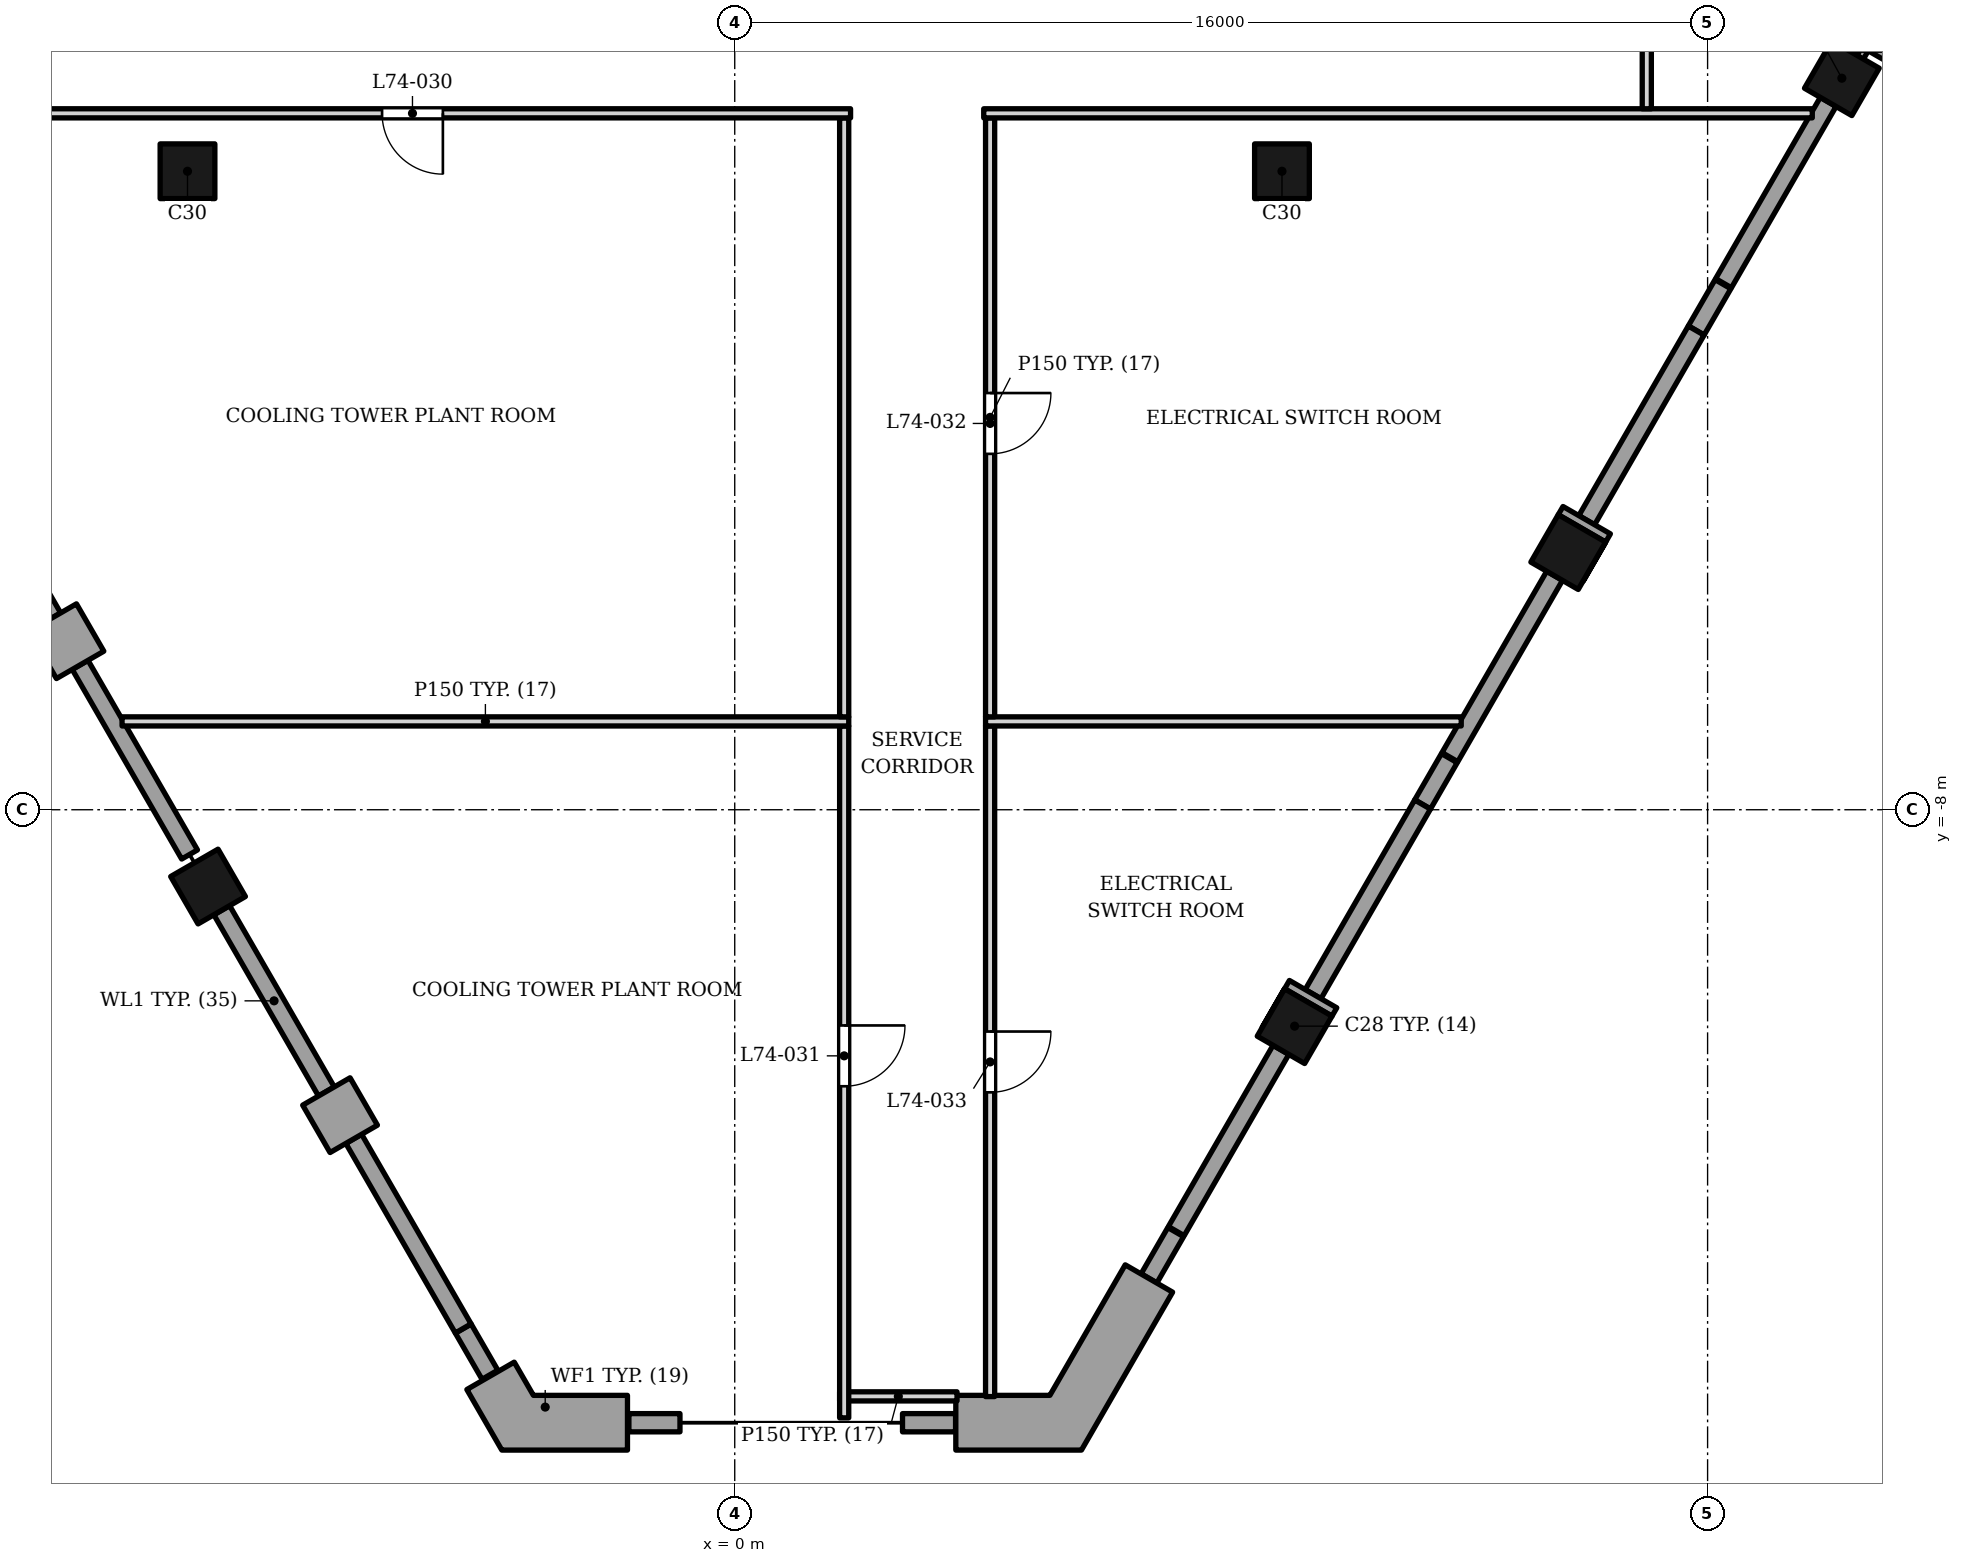
"""IFC4 building model, lengths in metres.
Left out: names, types, materials, properties, quantities, classifications, styles, units other than length and angle.
Written with IfcOpenShell. Run it as: python <this file> out.ifc"""

import sys

from ifc_helpers import new_model, si_unit, direction, frame, frame_2d, origin, origin_2d, place, context, subcontext, project, spatial, polyline, rectangle, outline, extrude, element, fill, save


model = new_model("IFC4")
c1 = context("Model", 3, precision=1e-05, world=origin(), true_north=direction((0.0, 1.0)))
c2 = subcontext(c1, "Body", "Model", "MODEL_VIEW")
j1 = project(units=[si_unit("LENGTHUNIT", "METRE"), si_unit("PLANEANGLEUNIT", "RADIAN")], contexts=[c1])
p1 = place(None, origin())
s1 = spatial("IfcSite", under=j1, at=p1, CompositionType="ELEMENT")
p2 = place(p1, origin())
s2 = spatial("IfcBuilding", under=s1, at=p2, CompositionType="ELEMENT")
p3 = place(p2, frame((0.0, 0.0, 315.5)))
s3 = spatial("IfcBuildingStorey", under=s2, at=p3, CompositionType="ELEMENT", Elevation=315.5)
for number, where, z_axis, x_axis in (
    (1, (-9.0, 2.5, 0.0), (0.0, 0.0, 1.0), (1.0, 0.0, 0.0)),
    (2, (9.0, 2.5, 0.0), (0.0, 0.0, 1.0), (1.0, 0.0, 0.0)),
    (3, (-8.662, -9.263, 0.0), (0.0, 0.0, 1.0), (0.5, -0.866, 0.0)),
    (4, (9.208, -11.559, 0.0), (0.0, 0.0, 1.0), (0.5, 0.866, 0.0)),
    (5, (13.708, -3.763, 0.0), (0.0, 0.0, 1.0), (0.5, 0.866, 0.0)),
    (6, (18.208, 4.03, 0.0), (0.0, 0.0, 1.0), (0.5, 0.866, 0.0)),
):
    element("IfcColumn", number, at=place(p3, frame(where, z_axis=z_axis, x_axis=x_axis)), inside=s3, PredefinedType="COLUMN", context=c2, shape_type="SweptSolid", body=[
        extrude(rectangle(XDim=0.9, YDim=0.9, at=origin_2d()), origin(), (0.0, 0.0, 1.0), 5.0),
    ])
for number, where, z_axis, x_axis in (
    (7, (-11.216, -4.839, 0.0), (0.0, 0.0, 1.0), (0.5, -0.866, 0.0)),
    (8, (-6.716, -12.633, 0.0), (0.0, 0.0, 1.0), (0.5, -0.866, 0.0)),
):
    element("IfcWall", number, at=place(p3, frame(where, z_axis=z_axis, x_axis=x_axis)), inside=s3, PredefinedType="SOLIDWALL", context=c2, shape_type="SweptSolid", body=[
        extrude(rectangle(XDim=0.9, YDim=0.9, at=frame_2d((0.45, 0.0))), origin(), (0.0, 0.0, 1.0), 3.8),
    ])
p4 = place(p3, origin())
e9 = element("IfcWall", 9, at=p4, inside=s3, PredefinedType="ELEMENTEDWALL", context=c2, shape_type="SweptSolid", body=[
    extrude(outline(polyline([(-11.086, -4.764), (-12.807, -1.783), (-13.067, -1.933), (-11.346, -4.914), (-11.086, -4.764)])), origin(), (0.0, 0.0, 1.0), 3.8),
])
p5 = place(p3, frame((-10.766, -5.618, 0.0), z_axis=(0.0, 0.0, 1.0), x_axis=(0.499961193289, -0.866047807691, 0.0)))
e10 = element("IfcWall", 10, at=p5, inside=s3, PredefinedType="ELEMENTEDWALL", context=c2, shape_type="SweptSolid", body=[
    extrude(rectangle(XDim=3.6, YDim=0.3, at=frame_2d((1.8, 0.0))), origin(), (0.0, 0.0, 1.0), 3.8),
])
p6 = place(p3, origin())
e11 = element("IfcWall", 11, at=p6, inside=s3, PredefinedType="ELEMENTEDWALL", context=c2, shape_type="SweptSolid", body=[
    extrude(outline(polyline([(-6.586, -12.558), (-8.307, -9.578), (-8.567, -9.728), (-6.846, -12.708), (-6.586, -12.558)])), origin(), (0.0, 0.0, 1.0), 3.8),
])
p7 = place(p3, frame((-6.266, -13.412, 0.0), z_axis=(0.0, 0.0, 1.0), x_axis=(0.499961193289, -0.866047807691, 0.0)))
e12 = element("IfcWall", 12, at=p7, inside=s3, PredefinedType="ELEMENTEDWALL", context=c2, shape_type="SweptSolid", body=[
    extrude(rectangle(XDim=3.6, YDim=0.3, at=frame_2d((1.8, 0.0))), origin(), (0.0, 0.0, 1.0), 3.8),
])
p8 = place(p3, origin())
e13 = element("IfcWall", 13, at=p8, inside=s3, PredefinedType="SOLIDWALL", context=c2, shape_type="SweptSolid", body=[
    extrude(outline(polyline([(9.122, -10.807), (8.672, -11.587), (8.672, -11.587), (9.043, -10.944), (9.823, -11.394), (9.902, -11.257), (9.122, -10.807)])), origin(), (0.0, 0.0, 1.0), 3.8),
])
p9 = place(p3, origin())
e14 = element("IfcWall", 14, at=p9, inside=s3, PredefinedType="SOLIDWALL", context=c2, shape_type="SweptSolid", body=[
    extrude(outline(polyline([(14.402, -3.463), (13.622, -3.013), (13.544, -3.149), (14.323, -3.598), (13.951, -4.242), (13.952, -4.242), (14.402, -3.463)])), origin(), (0.0, 0.0, 1.0), 3.8),
])
p10 = place(p3, origin())
e15 = element("IfcWall", 15, at=p10, inside=s3, PredefinedType="ELEMENTEDWALL", context=c2, shape_type="SweptSolid", body=[
    extrude(outline(polyline([(7.392, -15.004), (9.113, -12.024), (8.853, -11.874), (7.132, -14.854), (7.392, -15.004)])), origin(), (0.0, 0.0, 1.0), 3.8),
])
p11 = place(p3, frame((9.512, -11.032, 0.0), z_axis=(0.0, 0.0, 1.0), x_axis=(0.500012057535, 0.866018442252, 0.0)))
e16 = element("IfcWall", 16, at=p11, inside=s3, PredefinedType="ELEMENTEDWALL", context=c2, shape_type="SweptSolid", body=[
    extrude(rectangle(XDim=3.6, YDim=0.3, at=frame_2d((1.8, 0.0))), origin(), (0.0, 0.0, 1.0), 3.8),
])
p12 = place(p3, origin())
e17 = element("IfcWall", 17, at=p12, inside=s3, PredefinedType="ELEMENTEDWALL", context=c2, shape_type="SweptSolid", body=[
    extrude(outline(polyline([(11.892, -7.21), (13.614, -4.228), (13.354, -4.078), (11.632, -7.06), (11.892, -7.21)])), origin(), (0.0, 0.0, 1.0), 3.8),
])
p13 = place(p3, frame((14.012, -3.238, 0.0), z_axis=(0.0, 0.0, 1.0), x_axis=(0.500012057535, 0.866018442252, 0.0)))
e18 = element("IfcWall", 18, at=p13, inside=s3, PredefinedType="ELEMENTEDWALL", context=c2, shape_type="SweptSolid", body=[
    extrude(rectangle(XDim=3.6, YDim=0.3, at=frame_2d((1.8, 0.0))), origin(), (0.0, 0.0, 1.0), 3.8),
])
p14 = place(p3, origin())
e19 = element("IfcWall", 19, at=p14, inside=s3, PredefinedType="ELEMENTEDWALL", context=c2, shape_type="SweptSolid", body=[
    extrude(outline(polyline([(16.392, 0.584), (18.113, 3.565), (17.853, 3.715), (16.132, 0.734), (16.392, 0.584)])), origin(), (0.0, 0.0, 1.0), 3.8),
])
p15 = place(p3, origin())
e20 = element("IfcWall", 20, at=p15, inside=s3, PredefinedType="SOLIDWALL", context=c2, shape_type="SweptSolid", body=[
    extrude(outline(polyline([(-3.626, -17.084), (-4.406, -17.535), (-3.831, -18.531), (-1.764, -18.531), (-1.764, -17.631), (-3.311, -17.631), (-3.626, -17.084)])), origin(), (0.0, 0.0, 1.0), 3.297),
])
p16 = place(p3, origin())
e21 = element("IfcWall", 21, at=p16, inside=s3, PredefinedType="SOLIDWALL", context=c2, shape_type="SweptSolid", body=[
    extrude(outline(polyline([(3.636, -17.631), (3.636, -18.531), (5.702, -18.531), (7.202, -15.934), (6.422, -15.484), (5.183, -17.631), (3.636, -17.631)])), origin(), (0.0, 0.0, 1.0), 3.297),
])
p17 = place(p3, origin())
e22 = element("IfcWall", 22, at=p17, inside=s3, PredefinedType="SOLIDWALL", context=c2, shape_type="SweptSolid", body=[
    extrude(outline(polyline([(18.122, 4.781), (18.902, 4.331), (20.247, 6.661), (21.059, 7.549), (20.395, 8.156), (19.516, 7.196), (18.122, 4.781)])), origin(), (0.0, 0.0, 1.0), 3.8),
])
p18 = place(p3, frame((-4.026, -17.292, 0.0), z_axis=(0.0, 0.0, 1.0), x_axis=(-0.500068485402, 0.865985860108, 0.0)))
e23 = element("IfcWall", 23, at=p18, inside=s3, PredefinedType="ELEMENTEDWALL", context=c2, shape_type="SweptSolid", body=[
    extrude(rectangle(XDim=0.875, YDim=0.3, at=frame_2d((0.438, 0.0))), origin(), (0.0, 0.0, 1.0), 3.8),
])
p19 = place(p3, frame((-1.741, -18.081, 0.0), z_axis=(0.0, 0.0, 1.0), x_axis=(1.0, 0.0, 0.0)))
e24 = element("IfcWall", 24, at=p19, inside=s3, PredefinedType="ELEMENTEDWALL", context=c2, shape_type="SweptSolid", body=[
    extrude(rectangle(XDim=0.84, YDim=0.3, at=frame_2d((0.42, 0.0))), origin(), (0.0, 0.0, 1.0), 3.279),
])
p20 = place(p3, frame((2.759, -18.081, 0.0), z_axis=(0.0, 0.0, 1.0), x_axis=(1.0, 0.0, 0.0)))
e25 = element("IfcWall", 25, at=p20, inside=s3, PredefinedType="ELEMENTEDWALL", context=c2, shape_type="SweptSolid", body=[
    extrude(rectangle(XDim=0.873, YDim=0.3, at=frame_2d((0.436, 0.0))), origin(), (0.0, 0.0, 1.0), 3.279),
])
for number, where, z_axis, x_axis in (
    (26, (6.814, -15.705, 0.0), (0.0, 0.0, 1.0), (0.5, 0.866, 0.0)),
    (27, (11.752, -7.152, 0.0), (0.0, 0.0, 1.0), (-0.5, -0.866, 0.0)),
):
    element("IfcWall", number, at=place(p3, frame(where, z_axis=z_axis, x_axis=x_axis)), inside=s3, PredefinedType="ELEMENTEDWALL", context=c2, shape_type="SweptSolid", body=[
        extrude(rectangle(XDim=0.877, YDim=0.3, at=frame_2d((0.438, 0.0))), origin(), (0.0, 0.0, 1.0), 3.8),
    ])
p21 = place(p3, frame((15.814, -0.117, 0.0), z_axis=(0.0, 0.0, 1.0), x_axis=(0.499850947872, 0.86611144197, 0.0)))
e28 = element("IfcWall", 28, at=p21, inside=s3, PredefinedType="ELEMENTEDWALL", context=c2, shape_type="SweptSolid", body=[
    extrude(rectangle(XDim=0.877, YDim=0.3, at=frame_2d((0.438, 0.0))), origin(), (0.0, 0.0, 1.0), 3.8),
])
p22 = place(p3, frame((18.585, 4.383, 0.0), z_axis=(0.0, 0.0, 1.0), x_axis=(-0.866131372301, 0.499816412211, 0.0)))
e29 = element("IfcWall", 29, at=p22, inside=s3, PredefinedType="ELEMENTEDWALL", context=c2, shape_type="SweptSolid", body=[
    extrude(rectangle(XDim=0.3, YDim=0.19, at=frame_2d((0.15, 0.0))), origin(), (0.0, 0.0, 1.0), 3.8),
])
p23 = place(p3, frame((1.725, -17.647, 0.0), z_axis=(0.0, 0.0, 1.0), x_axis=(1.0, 0.0, 0.0)))
e30 = element("IfcWall", 30, at=p23, inside=s3, PredefinedType="PARTITIONING", context=c2, shape_type="SweptSolid", body=[
    extrude(rectangle(XDim=1.931, YDim=0.15, at=frame_2d((0.965, 0.0))), origin(), (0.0, 0.0, 1.0), 3.976),
])
p24 = place(p3, frame((1.8, -18.001, 0.0), z_axis=(0.0, 0.0, 1.0), x_axis=(0.0, 1.0, 0.0)))
e31 = element("IfcWall", 31, at=p24, inside=s3, PredefinedType="PARTITIONING", context=c2, shape_type="SweptSolid", body=[
    extrude(outline(polyline([(0.0, 0.0), (11.378, 0.0), (11.378, 4.8), (1.261, 4.8), (0.0, 3.742), (0.0, 0.0)])), frame((0.0, 0.075, 0.0), z_axis=(0.0, -1.0, 0.0), x_axis=(1.0, 0.0, 0.0)), (0.0, 0.0, 1.0), 0.15),
])
p25 = place(p24, frame((5.453, 0.0, 0.0)))
e32 = element("IfcOpeningElement", 32, at=p25, cuts=e31, PredefinedType="OPENING", context=c2, shape_type="SweptSolid", body=[
    extrude(rectangle(XDim=1.0, YDim=2.1, at=frame_2d((0.5, 1.05))), frame((0.0, 0.085, 0.0), z_axis=(0.0, -1.0, 0.0), x_axis=(1.0, 0.0, 0.0)), (0.0, 0.0, 1.0), 0.17),
])
p26 = place(p3, frame((4.2, -17.651, 0.0), z_axis=(0.0, 0.0, 1.0), x_axis=(0.0, 1.0, 0.0)))
e33 = element("IfcWall", 33, at=p26, inside=s3, PredefinedType="PARTITIONING", context=c2, shape_type="SweptSolid", body=[
    extrude(outline(polyline([(0.0, 0.0), (11.028, 0.0), (11.028, 4.8), (0.911, 4.8), (0.0, 4.036), (0.0, 0.0)])), frame((0.0, 0.075, 0.0), z_axis=(0.0, -1.0, 0.0), x_axis=(1.0, 0.0, 0.0)), (0.0, 0.0, 1.0), 0.15),
])
p27 = place(p26, frame((5.003, 0.0, 0.0)))
e34 = element("IfcOpeningElement", 34, at=p27, cuts=e33, PredefinedType="OPENING", context=c2, shape_type="SweptSolid", body=[
    extrude(rectangle(XDim=1.0, YDim=2.1, at=frame_2d((0.5, 1.05))), frame((0.0, 0.085, 0.0), z_axis=(0.0, -1.0, 0.0), x_axis=(1.0, 0.0, 0.0)), (0.0, 0.0, 1.0), 0.17),
])
p28 = place(p3, frame((-10.076, -6.547, 0.0), z_axis=(0.0, 0.0, 1.0), x_axis=(1.0, 0.0, 0.0)))
e35 = element("IfcWall", 35, at=p28, inside=s3, PredefinedType="PARTITIONING", context=c2, shape_type="SweptSolid", body=[
    extrude(rectangle(XDim=11.951, YDim=0.15, at=frame_2d((5.976, 0.0))), origin(), (0.0, 0.0, 1.0), 4.272),
])
p29 = place(p3, frame((4.125, -6.547, 0.0), z_axis=(0.0, 0.0, 1.0), x_axis=(1.0, 0.0, 0.0)))
e36 = element("IfcWall", 36, at=p29, inside=s3, PredefinedType="PARTITIONING", context=c2, shape_type="SweptSolid", body=[
    extrude(rectangle(XDim=7.823, YDim=0.15, at=frame_2d((3.912, 0.0))), origin(), (0.0, 0.0, 1.0), 4.198),
])
p30 = place(p3, frame((1.8, -6.472, 0.0), z_axis=(0.0, 0.0, 1.0), x_axis=(0.0, 1.0, 0.0)))
e37 = element("IfcWall", 37, at=p30, inside=s3, PredefinedType="PARTITIONING", context=c2, shape_type="SweptSolid", body=[
    extrude(rectangle(XDim=9.85, YDim=0.15, at=frame_2d((4.925, 0.0))), origin(), (0.0, 0.0, 1.0), 4.8),
])
p31 = place(p3, frame((4.2, -6.472, 0.0), z_axis=(0.0, 0.0, 1.0), x_axis=(0.0, 1.0, 0.0)))
e38 = element("IfcWall", 38, at=p31, inside=s3, PredefinedType="PARTITIONING", context=c2, shape_type="SweptSolid", body=[
    extrude(rectangle(XDim=9.85, YDim=0.15, at=frame_2d((4.925, 0.0))), origin(), (0.0, 0.0, 1.0), 4.8),
])
p32 = place(p31, frame((4.325, 0.0, 0.0)))
e39 = element("IfcOpeningElement", 39, at=p32, cuts=e38, PredefinedType="OPENING", context=c2, shape_type="SweptSolid", body=[
    extrude(rectangle(XDim=1.0, YDim=2.1, at=frame_2d((0.5, 1.05))), frame((0.0, 0.085, 0.0), z_axis=(0.0, -1.0, 0.0), x_axis=(1.0, 0.0, 0.0)), (0.0, 0.0, 1.0), 0.17),
])
p33 = place(p3, frame((-15.85, 3.453, 0.0), z_axis=(0.0, 0.0, 1.0), x_axis=(1.0, 0.0, 0.0)))
e40 = element("IfcWall", 40, at=p33, inside=s3, PredefinedType="PARTITIONING", context=c2, shape_type="SweptSolid", body=[
    extrude(rectangle(XDim=17.755, YDim=0.15, at=frame_2d((8.877, 0.0))), origin(), (0.0, 0.0, 1.0), 4.1),
])
p34 = place(p33, frame((10.05, 0.0, 0.0)))
e41 = element("IfcOpeningElement", 41, at=p34, cuts=e40, PredefinedType="OPENING", context=c2, shape_type="SweptSolid", body=[
    extrude(rectangle(XDim=1.0, YDim=2.1, at=frame_2d((0.5, 1.05))), frame((0.0, 0.085, 0.0), z_axis=(0.0, -1.0, 0.0), x_axis=(1.0, 0.0, 0.0)), (0.0, 0.0, 1.0), 0.17),
])
p35 = place(p3, frame((4.095, 3.453, 0.0), z_axis=(0.0, 0.0, 1.0), x_axis=(1.0, 0.0, 0.0)))
e42 = element("IfcWall", 42, at=p35, inside=s3, PredefinedType="PARTITIONING", context=c2, shape_type="SweptSolid", body=[
    extrude(rectangle(XDim=13.627, YDim=0.15, at=frame_2d((6.813, 0.0))), origin(), (0.0, 0.0, 1.0), 4.1),
])
p36 = place(p3, frame((15.0, 3.528, 0.0), z_axis=(0.0, 0.0, 1.0), x_axis=(0.0, 1.0, 0.0)))
e43 = element("IfcWall", 43, at=p36, inside=s3, PredefinedType="PARTITIONING", context=c2, shape_type="SweptSolid", body=[
    extrude(rectangle(XDim=9.956, YDim=0.15, at=frame_2d((4.978, 0.0))), origin(), (0.0, 0.0, 1.0), 4.02),
])
p37 = place(p36, frame((4.431, 0.0, 0.0)))
e44 = element("IfcOpeningElement", 44, at=p37, cuts=e43, PredefinedType="OPENING", context=c2, shape_type="SweptSolid", body=[
    extrude(rectangle(XDim=1.0, YDim=2.1, at=frame_2d((0.5, 1.05))), frame((0.0, 0.085, 0.0), z_axis=(0.0, -1.0, 0.0), x_axis=(1.0, 0.0, 0.0)), (0.0, 0.0, 1.0), 0.17),
])
p38 = place(p34, origin())
e45 = element("IfcDoor", 45, at=p38, inside=s3, OperationType="SINGLE_SWING_RIGHT", PredefinedType="DOOR", context=c2, shape_type="SweptSolid", body=[
    extrude(rectangle(XDim=1.0, YDim=2.1, at=frame_2d((0.5, 1.05))), frame((0.0, 0.025, 0.0), z_axis=(0.0, -1.0, 0.0), x_axis=(1.0, 0.0, 0.0)), (0.0, 0.0, 1.0), 0.05),
])
fill(e41, e45)
p39 = place(p25, origin())
e46 = element("IfcDoor", 46, at=p39, inside=s3, OperationType="SINGLE_SWING_RIGHT", PredefinedType="DOOR", context=c2, shape_type="SweptSolid", body=[
    extrude(rectangle(XDim=1.0, YDim=2.1, at=frame_2d((0.5, 1.05))), frame((0.0, 0.025, 0.0), z_axis=(0.0, -1.0, 0.0), x_axis=(1.0, 0.0, 0.0)), (0.0, 0.0, 1.0), 0.05),
])
fill(e32, e46)
p40 = place(p32, origin())
e47 = element("IfcDoor", 47, at=p40, inside=s3, OperationType="SINGLE_SWING_RIGHT", PredefinedType="DOOR", context=c2, shape_type="SweptSolid", body=[
    extrude(rectangle(XDim=1.0, YDim=2.1, at=frame_2d((0.5, 1.05))), frame((0.0, 0.025, 0.0), z_axis=(0.0, -1.0, 0.0), x_axis=(1.0, 0.0, 0.0)), (0.0, 0.0, 1.0), 0.05),
])
fill(e39, e47)
p41 = place(p27, origin())
e48 = element("IfcDoor", 48, at=p41, inside=s3, OperationType="SINGLE_SWING_RIGHT", PredefinedType="DOOR", context=c2, shape_type="SweptSolid", body=[
    extrude(rectangle(XDim=1.0, YDim=2.1, at=frame_2d((0.5, 1.05))), frame((0.0, 0.025, 0.0), z_axis=(0.0, -1.0, 0.0), x_axis=(1.0, 0.0, 0.0)), (0.0, 0.0, 1.0), 0.05),
])
fill(e34, e48)
save(model, sys.argv[1])
